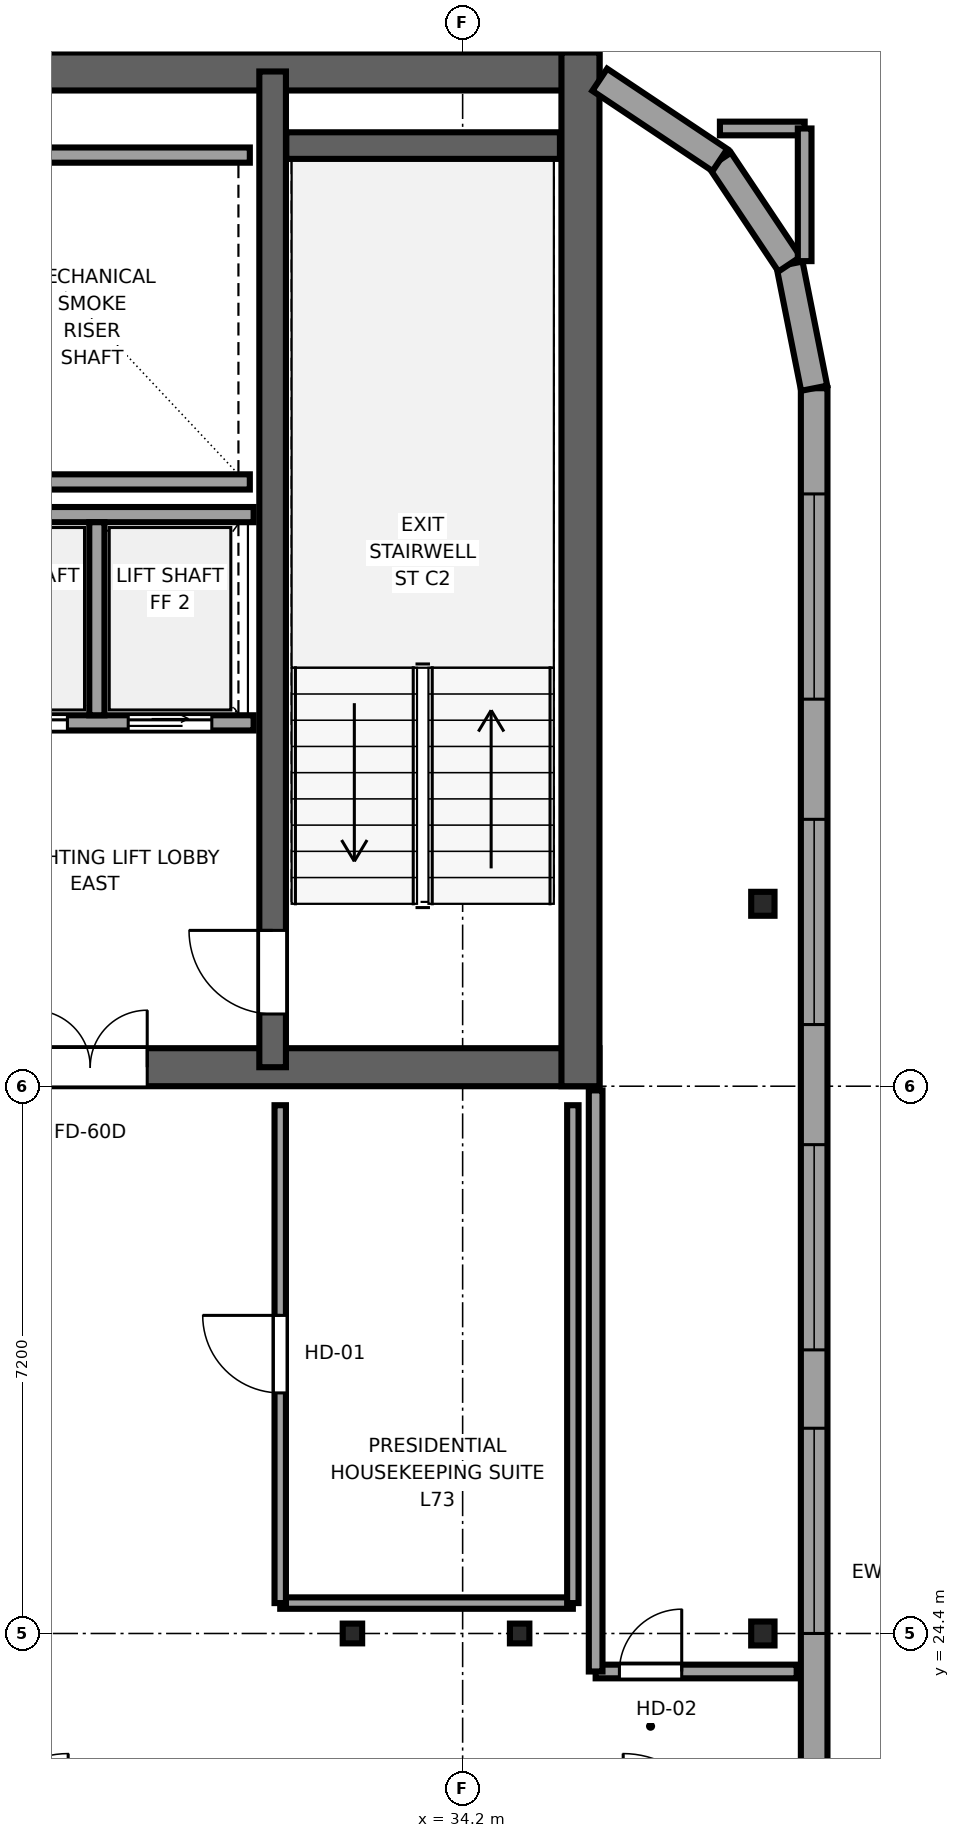
"""IFC4 building model, lengths in metres.
Left out: names, types, materials, properties, quantities, classifications, styles, units other than length and angle.
Written with IfcOpenShell. Run it as: python <this file> out.ifc"""

import sys

from ifc_helpers import new_model, si_unit, direction, frame, frame_2d, origin, origin_2d, place, context, subcontext, project, spatial, rectangle, i_section, extrude, source, transform, mapped, element, fill, save


model = new_model("IFC4")
c1 = context("Model", 3, precision=1e-05, world=origin(), true_north=direction((0.0, 1.0)))
c2 = subcontext(c1, "Body", "Model", "MODEL_VIEW")
j1 = project(units=[si_unit("LENGTHUNIT", "METRE"), si_unit("PLANEANGLEUNIT", "RADIAN")], contexts=[c1])
p1 = place(None, origin())
s1 = spatial("IfcSite", under=j1, at=p1, CompositionType="ELEMENT")
p2 = place(p1, origin())
s2 = spatial("IfcBuilding", under=s1, at=p2, CompositionType="ELEMENT")
p3 = place(p2, frame((0.0, 0.0, 275.05)))
s3 = spatial("IfcBuildingStorey", under=s2, at=p3, CompositionType="ELEMENT", Elevation=275.05)
p4 = place(p3, frame((10.0, 31.85, 0.0), z_axis=(0.0, 0.0, 1.0), x_axis=(1.0, 0.0, 0.0)))
e1 = element("IfcWall", 1, at=p4, inside=s3, PredefinedType="SHEAR", context=c2, shape_type="SweptSolid", body=[
    extrude(rectangle(XDim=26.0, YDim=0.5, at=frame_2d((13.0, 0.0))), origin(), (0.0, 0.0, 1.0), 3.55),
])
p5 = place(p4, frame((7.45, 0.0, 0.0), z_axis=(0.0, 0.0, 1.0), x_axis=(-1.0, 0.0, 0.0)))
e2 = element("IfcOpeningElement", 2, at=p5, cuts=e1, PredefinedType="OPENING", context=c2, shape_type="SweptSolid", body=[
    extrude(rectangle(XDim=1.5, YDim=2.04, at=frame_2d((0.75, 1.02))), frame((0.0, 0.26, 0.0), z_axis=(0.0, -1.0, 0.0), x_axis=(1.0, 0.0, 0.0)), (0.0, 0.0, 1.0), 0.52),
])
p6 = place(p4, frame((13.75, 0.0, 0.0), z_axis=(0.0, 0.0, 1.0), x_axis=(-1.0, 0.0, 0.0)))
e3 = element("IfcOpeningElement", 3, at=p6, cuts=e1, PredefinedType="OPENING", context=c2, shape_type="SweptSolid", body=[
    extrude(rectangle(XDim=1.5, YDim=2.04, at=frame_2d((0.75, 1.02))), frame((0.0, 0.26, 0.0), z_axis=(0.0, -1.0, 0.0), x_axis=(1.0, 0.0, 0.0)), (0.0, 0.0, 1.0), 0.52),
])
p7 = place(p4, frame((20.05, 0.0, 0.0), z_axis=(0.0, 0.0, 1.0), x_axis=(-1.0, 0.0, 0.0)))
e4 = element("IfcOpeningElement", 4, at=p7, cuts=e1, PredefinedType="OPENING", context=c2, shape_type="SweptSolid", body=[
    extrude(rectangle(XDim=1.5, YDim=2.04, at=frame_2d((0.75, 1.02))), frame((0.0, 0.26, 0.0), z_axis=(0.0, -1.0, 0.0), x_axis=(1.0, 0.0, 0.0)), (0.0, 0.0, 1.0), 0.52),
])
p8 = place(p3, frame((10.0, 44.95, 0.0), z_axis=(0.0, 0.0, 1.0), x_axis=(1.0, 0.0, 0.0)))
e5 = element("IfcWall", 5, at=p8, inside=s3, PredefinedType="SHEAR", context=c2, shape_type="SweptSolid", body=[
    extrude(rectangle(XDim=26.0, YDim=0.5, at=frame_2d((13.0, 0.0))), origin(), (0.0, 0.0, 1.0), 3.55),
])
p9 = place(p3, frame((35.75, 31.6, 0.0), z_axis=(0.0, 0.0, 1.0), x_axis=(0.0, 1.0, 0.0)))
e6 = element("IfcWall", 6, at=p9, inside=s3, PredefinedType="SHEAR", context=c2, shape_type="SweptSolid", body=[
    extrude(rectangle(XDim=13.6, YDim=0.5, at=frame_2d((6.8, 0.0))), origin(), (0.0, 0.0, 1.0), 3.55),
])
p10 = place(p3, frame((31.7, 31.85, 0.0), z_axis=(0.0, 0.0, 1.0), x_axis=(0.0, 1.0, 0.0)))
e7 = element("IfcWall", 7, at=p10, inside=s3, PredefinedType="SHEAR", context=c2, shape_type="SweptSolid", body=[
    extrude(rectangle(XDim=13.1, YDim=0.35, at=frame_2d((6.55, 0.0))), origin(), (0.0, 0.0, 1.0), 3.55),
])
p11 = place(p10, frame((1.8, 0.0, 0.0), z_axis=(0.0, 0.0, 1.0), x_axis=(-1.0, 0.0, 0.0)))
e8 = element("IfcOpeningElement", 8, at=p11, cuts=e7, PredefinedType="OPENING", context=c2, shape_type="SweptSolid", body=[
    extrude(rectangle(XDim=1.1, YDim=2.12, at=frame_2d((0.55, 1.06))), frame((0.0, 0.185, 0.0), z_axis=(0.0, -1.0, 0.0), x_axis=(1.0, 0.0, 0.0)), (0.0, 0.0, 1.0), 0.37),
])
p12 = place(p3, frame((31.88, 43.975, 0.0), z_axis=(0.0, 0.0, 1.0), x_axis=(1.0, 0.0, 0.0)))
e9 = element("IfcWall", 9, at=p12, inside=s3, PredefinedType="SHEAR", context=c2, shape_type="SweptSolid", body=[
    extrude(rectangle(XDim=3.6, YDim=0.35, at=frame_2d((1.8, 0.0))), origin(), (0.0, 0.0, 1.0), 3.55),
])
m1 = source(origin(), c2, "Body", "SweptSolid", [
    extrude(i_section(OverallWidth=0.256, OverallDepth=0.26, WebThickness=0.01, FlangeThickness=0.017, FilletRadius=0.014, at=origin_2d()), origin(), (0.0, 0.0, 1.0), 3.55),
])
for number, where, z_axis, x_axis in (
    (10, (32.75, 24.4, 0.0), (0.0, 0.0, 1.0), (1.0, 0.0, 0.0)),
    (11, (34.95, 24.4, 0.0), (0.0, 0.0, 1.0), (1.0, 0.0, 0.0)),
):
    element("IfcColumn", number, at=place(p3, frame(where, z_axis=z_axis, x_axis=x_axis)), inside=s3, PredefinedType="COLUMN", context=c2, shape_type="MappedRepresentation", body=[
        mapped(m1, transform((0.0, 0.0, 0.0), x_axis=(1.0, 0.0, 0.0), y_axis=(0.0, 1.0, 0.0), z_axis=(0.0, 0.0, 1.0), scale=1.0)),
    ])
m2 = source(origin(), c2, "Body", "SweptSolid", [
    extrude(i_section(OverallWidth=0.307, OverallDepth=0.315, WebThickness=0.012, FlangeThickness=0.019, FilletRadius=0.017, at=origin_2d()), origin(), (0.0, 0.0, 1.0), 3.55),
])
for number, where, z_axis, x_axis in (
    (12, (38.15, 24.4, 0.0), (0.0, 0.0, 1.0), (1.0, 0.0, 0.0)),
    (13, (38.15, 34.0, 0.0), (0.0, 0.0, 1.0), (1.0, 0.0, 0.0)),
):
    element("IfcColumn", number, at=place(p3, frame(where, z_axis=z_axis, x_axis=x_axis)), inside=s3, PredefinedType="COLUMN", context=c2, shape_type="MappedRepresentation", body=[
        mapped(m2, transform((0.0, 0.0, 0.0), x_axis=(1.0, 0.0, 0.0), y_axis=(0.0, 1.0, 0.0), z_axis=(0.0, 0.0, 1.0), scale=1.0)),
    ])
p13 = place(p3, frame((38.825, 9.617, 0.0), z_axis=(0.0, 0.0, 1.0), x_axis=(0.0, 1.0, 0.0)))
e14 = element("IfcWall", 14, at=p13, inside=s3, PredefinedType="SOLIDWALL", context=c2, shape_type="SweptSolid", body=[
    extrude(rectangle(XDim=31.166, YDim=0.35, at=frame_2d((15.583, 0.0))), origin(), (0.0, 0.0, 1.0), 3.33),
])
p14 = place(p13, frame((0.84, 0.0, 0.68)))
e15 = element("IfcOpeningElement", 15, at=p14, cuts=e14, PredefinedType="OPENING", context=c2, shape_type="SweptSolid", body=[
    extrude(rectangle(XDim=2.7, YDim=1.95, at=frame_2d((1.35, 0.975))), frame((0.0, 0.185, 0.0), z_axis=(0.0, -1.0, 0.0), x_axis=(1.0, 0.0, 0.0)), (0.0, 0.0, 1.0), 0.37),
])
p15 = place(p13, frame((5.671, 0.0, 0.68)))
e16 = element("IfcOpeningElement", 16, at=p15, cuts=e14, PredefinedType="OPENING", context=c2, shape_type="SweptSolid", body=[
    extrude(rectangle(XDim=2.7, YDim=1.95, at=frame_2d((1.35, 0.975))), frame((0.0, 0.185, 0.0), z_axis=(0.0, -1.0, 0.0), x_axis=(1.0, 0.0, 0.0)), (0.0, 0.0, 1.0), 0.37),
])
p16 = place(p13, frame((8.902, 0.0, 0.68)))
e17 = element("IfcOpeningElement", 17, at=p16, cuts=e14, PredefinedType="OPENING", context=c2, shape_type="SweptSolid", body=[
    extrude(rectangle(XDim=2.7, YDim=1.95, at=frame_2d((1.35, 0.975))), frame((0.0, 0.185, 0.0), z_axis=(0.0, -1.0, 0.0), x_axis=(1.0, 0.0, 0.0)), (0.0, 0.0, 1.0), 0.37),
])
p17 = place(p13, frame((14.783, 0.0, 0.68)))
e18 = element("IfcOpeningElement", 18, at=p17, cuts=e14, PredefinedType="OPENING", context=c2, shape_type="SweptSolid", body=[
    extrude(rectangle(XDim=2.7, YDim=1.95, at=frame_2d((1.35, 0.975))), frame((0.0, 0.185, 0.0), z_axis=(0.0, -1.0, 0.0), x_axis=(1.0, 0.0, 0.0)), (0.0, 0.0, 1.0), 0.37),
])
p18 = place(p13, frame((18.514, 0.0, 0.68)))
e19 = element("IfcOpeningElement", 19, at=p18, cuts=e14, PredefinedType="OPENING", context=c2, shape_type="SweptSolid", body=[
    extrude(rectangle(XDim=2.7, YDim=1.95, at=frame_2d((1.35, 0.975))), frame((0.0, 0.185, 0.0), z_axis=(0.0, -1.0, 0.0), x_axis=(1.0, 0.0, 0.0)), (0.0, 0.0, 1.0), 0.37),
])
p19 = place(p13, frame((22.794, 0.0, 0.68)))
e20 = element("IfcOpeningElement", 20, at=p19, cuts=e14, PredefinedType="OPENING", context=c2, shape_type="SweptSolid", body=[
    extrude(rectangle(XDim=2.7, YDim=1.95, at=frame_2d((1.35, 0.975))), frame((0.0, 0.185, 0.0), z_axis=(0.0, -1.0, 0.0), x_axis=(1.0, 0.0, 0.0)), (0.0, 0.0, 1.0), 0.37),
])
p20 = place(p13, frame((27.075, 0.0, 0.68)))
e21 = element("IfcOpeningElement", 21, at=p20, cuts=e14, PredefinedType="OPENING", context=c2, shape_type="SweptSolid", body=[
    extrude(rectangle(XDim=2.7, YDim=1.95, at=frame_2d((1.35, 0.975))), frame((0.0, 0.185, 0.0), z_axis=(0.0, -1.0, 0.0), x_axis=(1.0, 0.0, 0.0)), (0.0, 0.0, 1.0), 0.37),
])
p21 = place(p3, frame((38.825, 40.783, 0.0), z_axis=(0.0, 0.0, 1.0), x_axis=(-0.195044345786, 0.980794424524, 0.0)))
e22 = element("IfcWall", 22, at=p21, inside=s3, PredefinedType="SOLIDWALL", context=c2, shape_type="SweptSolid", body=[
    extrude(rectangle(XDim=1.665, YDim=0.35, at=frame_2d((0.833, 0.0))), origin(), (0.0, 0.0, 1.0), 3.33),
])
p22 = place(p3, frame((38.5, 42.416, 0.0), z_axis=(0.0, 0.0, 1.0), x_axis=(-0.555520825599, 0.831502623162, 0.0)))
e23 = element("IfcWall", 23, at=p22, inside=s3, PredefinedType="SOLIDWALL", context=c2, shape_type="SweptSolid", body=[
    extrude(rectangle(XDim=1.647, YDim=0.35, at=frame_2d((0.824, 0.0))), origin(), (0.0, 0.0, 1.0), 3.33),
])
p23 = place(p3, frame((37.585, 43.785, 0.0), z_axis=(0.0, 0.0, 1.0), x_axis=(-0.831516639465, 0.555499845448, 0.0)))
e24 = element("IfcWall", 24, at=p23, inside=s3, PredefinedType="SOLIDWALL", context=c2, shape_type="SweptSolid", body=[
    extrude(rectangle(XDim=1.902, YDim=0.35, at=frame_2d((0.951, 0.0))), origin(), (0.0, 0.0, 1.0), 3.33),
])
for number, where, z_axis, x_axis in (
    (25, (27.3, 39.55, 0.0), (0.0, 0.0, 1.0), (1.0, 0.0, 0.0)),
    (26, (27.3, 43.85, 0.0), (0.0, 0.0, 1.0), (1.0, 0.0, 0.0)),
):
    element("IfcWall", number, at=place(p3, frame(where, z_axis=z_axis, x_axis=x_axis)), inside=s3, PredefinedType="SOLIDWALL", context=c2, shape_type="SweptSolid", body=[
        extrude(rectangle(XDim=4.1, YDim=0.2, at=frame_2d((2.05, 0.0))), origin(), (0.0, 0.0, 1.0), 3.33),
    ])
p24 = place(p3, frame((27.375, 36.38, 0.0), z_axis=(0.0, 0.0, 1.0), x_axis=(1.0, 0.0, 0.0)))
e27 = element("IfcWall", 27, at=p24, inside=s3, PredefinedType="SOLIDWALL", context=c2, shape_type="SweptSolid", body=[
    extrude(rectangle(XDim=4.075, YDim=0.2, at=frame_2d((2.038, 0.0))), origin(), (0.0, 0.0, 1.0), 3.33),
])
p25 = place(p24, frame((0.525, 0.0, 0.0)))
e28 = element("IfcOpeningElement", 28, at=p25, cuts=e27, PredefinedType="OPENING", context=c2, shape_type="SweptSolid", body=[
    extrude(rectangle(XDim=1.1, YDim=2.12, at=frame_2d((0.55, 1.06))), frame((0.0, 0.11, 0.0), z_axis=(0.0, -1.0, 0.0), x_axis=(1.0, 0.0, 0.0)), (0.0, 0.0, 1.0), 0.22),
])
p26 = place(p24, frame((2.425, 0.0, 0.0)))
e29 = element("IfcOpeningElement", 29, at=p26, cuts=e27, PredefinedType="OPENING", context=c2, shape_type="SweptSolid", body=[
    extrude(rectangle(XDim=1.1, YDim=2.12, at=frame_2d((0.55, 1.06))), frame((0.0, 0.11, 0.0), z_axis=(0.0, -1.0, 0.0), x_axis=(1.0, 0.0, 0.0)), (0.0, 0.0, 1.0), 0.22),
])
p27 = place(p3, frame((27.375, 39.12, 0.0), z_axis=(0.0, 0.0, 1.0), x_axis=(1.0, 0.0, 0.0)))
e30 = element("IfcWall", 30, at=p27, inside=s3, PredefinedType="SOLIDWALL", context=c2, shape_type="SweptSolid", body=[
    extrude(rectangle(XDim=4.075, YDim=0.2, at=frame_2d((2.038, 0.0))), origin(), (0.0, 0.0, 1.0), 3.33),
])
p28 = place(p3, frame((29.387, 36.48, 0.0), z_axis=(0.0, 0.0, 1.0), x_axis=(0.0, 1.0, 0.0)))
e31 = element("IfcWall", 31, at=p28, inside=s3, PredefinedType="SOLIDWALL", context=c2, shape_type="SweptSolid", body=[
    extrude(rectangle(XDim=2.54, YDim=0.2, at=frame_2d((1.27, 0.0))), origin(), (0.0, 0.0, 1.0), 3.33),
])
p29 = place(p3, frame((31.8, 24.8, 0.0), z_axis=(0.0, 0.0, 1.0), x_axis=(1.0, 0.0, 0.0)))
e32 = element("IfcWall", 32, at=p29, inside=s3, PredefinedType="PARTITIONING", context=c2, shape_type="SweptSolid", body=[
    extrude(rectangle(XDim=3.85, YDim=0.15, at=frame_2d((1.925, 0.0))), origin(), (0.0, 0.0, 1.0), 3.33),
])
p30 = place(p3, frame((31.8, 24.8, 0.0), z_axis=(0.0, 0.0, 1.0), x_axis=(0.0, 1.0, 0.0)))
e33 = element("IfcWall", 33, at=p30, inside=s3, PredefinedType="PARTITIONING", context=c2, shape_type="SweptSolid", body=[
    extrude(rectangle(XDim=6.55, YDim=0.15, at=frame_2d((3.275, 0.0))), origin(), (0.0, 0.0, 1.0), 3.33),
])
p31 = place(p30, frame((2.765, 0.0, 0.0)))
e34 = element("IfcOpeningElement", 34, at=p31, cuts=e33, PredefinedType="OPENING", context=c2, shape_type="SweptSolid", body=[
    extrude(rectangle(XDim=1.02, YDim=2.03, at=frame_2d((0.51, 1.015))), frame((0.0, 0.085, 0.0), z_axis=(0.0, -1.0, 0.0), x_axis=(1.0, 0.0, 0.0)), (0.0, 0.0, 1.0), 0.17),
])
p32 = place(p3, frame((35.65, 24.8, 0.0), z_axis=(0.0, 0.0, 1.0), x_axis=(0.0, 1.0, 0.0)))
e35 = element("IfcWall", 35, at=p32, inside=s3, PredefinedType="PARTITIONING", context=c2, shape_type="SweptSolid", body=[
    extrude(rectangle(XDim=6.55, YDim=0.15, at=frame_2d((3.275, 0.0))), origin(), (0.0, 0.0, 1.0), 3.33),
])
p33 = place(p3, frame((35.95, 23.9, 0.0), z_axis=(0.0, 0.0, 1.0), x_axis=(1.0, 0.0, 0.0)))
e36 = element("IfcWall", 36, at=p33, inside=s3, PredefinedType="PARTITIONING", context=c2, shape_type="SweptSolid", body=[
    extrude(rectangle(XDim=2.645, YDim=0.18, at=frame_2d((1.323, 0.0))), origin(), (0.0, 0.0, 1.0), 3.33),
])
p34 = place(p33, frame((0.312, 0.0, 0.0)))
e37 = element("IfcOpeningElement", 37, at=p34, cuts=e36, PredefinedType="OPENING", context=c2, shape_type="SweptSolid", body=[
    extrude(rectangle(XDim=0.82, YDim=2.01, at=frame_2d((0.41, 1.005))), frame((0.0, 0.1, 0.0), z_axis=(0.0, -1.0, 0.0), x_axis=(1.0, 0.0, 0.0)), (0.0, 0.0, 1.0), 0.2),
])
p35 = place(p3, frame((37.585, 44.2, 0.0), z_axis=(0.0, 0.0, 1.0), x_axis=(1.0, 0.0, 0.0)))
e38 = element("IfcWall", 38, at=p35, inside=s3, PredefinedType="PARTITIONING", context=c2, shape_type="SweptSolid", body=[
    extrude(rectangle(XDim=1.115, YDim=0.18, at=frame_2d((0.558, 0.0))), origin(), (0.0, 0.0, 1.0), 3.33),
])
p36 = place(p3, frame((35.95, 23.9, 0.0), z_axis=(0.0, 0.0, 1.0), x_axis=(0.0, 1.0, 0.0)))
e39 = element("IfcWall", 39, at=p36, inside=s3, PredefinedType="PARTITIONING", context=c2, shape_type="SweptSolid", body=[
    extrude(rectangle(XDim=7.645, YDim=0.18, at=frame_2d((3.823, 0.0))), origin(), (0.0, 0.0, 1.0), 3.33),
])
p37 = place(p3, frame((38.7, 42.455, 0.0), z_axis=(0.0, 0.0, 1.0), x_axis=(0.0, 1.0, 0.0)))
e40 = element("IfcWall", 40, at=p37, inside=s3, PredefinedType="PARTITIONING", context=c2, shape_type="SweptSolid", body=[
    extrude(rectangle(XDim=1.745, YDim=0.18, at=frame_2d((0.873, 0.0))), origin(), (0.0, 0.0, 1.0), 3.33),
])
m3 = source(origin(), c2, "Body", "SweptSolid", [
    extrude(rectangle(XDim=2.7, YDim=1.95, at=frame_2d((1.35, 0.975))), frame((0.0, 0.09, 0.0), z_axis=(0.0, -1.0, 0.0), x_axis=(1.0, 0.0, 0.0)), (0.0, 0.0, 1.0), 0.06),
])
p38 = place(p17, origin())
e41 = element("IfcWindow", 41, at=p38, inside=s3, PartitioningType="TRIPLE_PANEL_HORIZONTAL", PredefinedType="WINDOW", context=c2, shape_type="MappedRepresentation", body=[
    mapped(m3, transform((0.0, 0.0, 0.0), x_axis=(1.0, 0.0, 0.0), y_axis=(0.0, 1.0, 0.0), z_axis=(0.0, 0.0, 1.0), scale=1.0)),
])
fill(e18, e41)
p39 = place(p18, origin())
e42 = element("IfcWindow", 42, at=p39, inside=s3, PartitioningType="TRIPLE_PANEL_HORIZONTAL", PredefinedType="WINDOW", context=c2, shape_type="MappedRepresentation", body=[
    mapped(m3, transform((0.0, 0.0, 0.0), x_axis=(1.0, 0.0, 0.0), y_axis=(0.0, 1.0, 0.0), z_axis=(0.0, 0.0, 1.0), scale=1.0)),
])
fill(e19, e42)
p40 = place(p19, origin())
e43 = element("IfcWindow", 43, at=p40, inside=s3, PartitioningType="TRIPLE_PANEL_HORIZONTAL", PredefinedType="WINDOW", context=c2, shape_type="MappedRepresentation", body=[
    mapped(m3, transform((0.0, 0.0, 0.0), x_axis=(1.0, 0.0, 0.0), y_axis=(0.0, 1.0, 0.0), z_axis=(0.0, 0.0, 1.0), scale=1.0)),
])
fill(e20, e43)
p41 = place(p20, origin())
e44 = element("IfcWindow", 44, at=p41, inside=s3, PartitioningType="TRIPLE_PANEL_HORIZONTAL", PredefinedType="WINDOW", context=c2, shape_type="MappedRepresentation", body=[
    mapped(m3, transform((0.0, 0.0, 0.0), x_axis=(1.0, 0.0, 0.0), y_axis=(0.0, 1.0, 0.0), z_axis=(0.0, 0.0, 1.0), scale=1.0)),
])
fill(e21, e44)
m4 = source(origin(), c2, "Body", "SweptSolid", [
    extrude(rectangle(XDim=1.1, YDim=2.12, at=frame_2d((0.55, 1.06))), frame((0.0, 0.025, 0.0), z_axis=(0.0, -1.0, 0.0), x_axis=(1.0, 0.0, 0.0)), (0.0, 0.0, 1.0), 0.05),
])
p42 = place(p11, origin())
e45 = element("IfcDoor", 45, at=p42, inside=s3, OperationType="SINGLE_SWING_RIGHT", PredefinedType="DOOR", context=c2, shape_type="MappedRepresentation", body=[
    mapped(m4, transform((0.0, 0.0, 0.0), x_axis=(1.0, 0.0, 0.0), y_axis=(0.0, 1.0, 0.0), z_axis=(0.0, 0.0, 1.0), scale=1.0)),
])
fill(e8, e45)
m5 = source(origin(), c2, "Body", "SweptSolid", [
    extrude(rectangle(XDim=1.5, YDim=2.04, at=frame_2d((0.75, 1.02))), frame((0.0, 0.025, 0.0), z_axis=(0.0, -1.0, 0.0), x_axis=(1.0, 0.0, 0.0)), (0.0, 0.0, 1.0), 0.05),
])
p43 = place(p7, origin())
e46 = element("IfcDoor", 46, at=p43, inside=s3, OperationType="DOUBLE_DOOR_SINGLE_SWING", PredefinedType="DOOR", context=c2, shape_type="MappedRepresentation", body=[
    mapped(m5, transform((0.0, 0.0, 0.0), x_axis=(1.0, 0.0, 0.0), y_axis=(0.0, 1.0, 0.0), z_axis=(0.0, 0.0, 1.0), scale=1.0)),
])
fill(e4, e46)
m6 = source(origin(), c2, "Body", "SweptSolid", [
    extrude(rectangle(XDim=1.1, YDim=2.12, at=frame_2d((0.55, 1.06))), frame((0.0, 0.025, 0.0), z_axis=(0.0, -1.0, 0.0), x_axis=(1.0, 0.0, 0.0)), (0.0, 0.0, 1.0), 0.05),
])
p44 = place(p25, origin())
e47 = element("IfcDoor", 47, at=p44, inside=s3, OperationType="SLIDING_TO_LEFT", PredefinedType="DOOR", context=c2, shape_type="MappedRepresentation", body=[
    mapped(m6, transform((0.0, 0.0, 0.0), x_axis=(1.0, 0.0, 0.0), y_axis=(0.0, 1.0, 0.0), z_axis=(0.0, 0.0, 1.0), scale=1.0)),
])
fill(e28, e47)
p45 = place(p26, origin())
e48 = element("IfcDoor", 48, at=p45, inside=s3, OperationType="SLIDING_TO_RIGHT", PredefinedType="DOOR", context=c2, shape_type="MappedRepresentation", body=[
    mapped(m6, transform((0.0, 0.0, 0.0), x_axis=(1.0, 0.0, 0.0), y_axis=(0.0, 1.0, 0.0), z_axis=(0.0, 0.0, 1.0), scale=1.0)),
])
fill(e29, e48)
m7 = source(origin(), c2, "Body", "SweptSolid", [
    extrude(rectangle(XDim=1.02, YDim=2.03, at=frame_2d((0.51, 1.015))), frame((0.0, 0.025, 0.0), z_axis=(0.0, -1.0, 0.0), x_axis=(1.0, 0.0, 0.0)), (0.0, 0.0, 1.0), 0.05),
])
p46 = place(p31, origin())
e49 = element("IfcDoor", 49, at=p46, inside=s3, OperationType="SINGLE_SWING_RIGHT", PredefinedType="DOOR", context=c2, shape_type="MappedRepresentation", body=[
    mapped(m7, transform((0.0, 0.0, 0.0), x_axis=(1.0, 0.0, 0.0), y_axis=(0.0, 1.0, 0.0), z_axis=(0.0, 0.0, 1.0), scale=1.0)),
])
fill(e34, e49)
m8 = source(origin(), c2, "Body", "SweptSolid", [
    extrude(rectangle(XDim=0.82, YDim=2.01, at=frame_2d((0.41, 1.005))), frame((0.0, 0.025, 0.0), z_axis=(0.0, -1.0, 0.0), x_axis=(1.0, 0.0, 0.0)), (0.0, 0.0, 1.0), 0.05),
])
p47 = place(p34, origin())
e50 = element("IfcDoor", 50, at=p47, inside=s3, OperationType="SINGLE_SWING_RIGHT", PredefinedType="DOOR", context=c2, shape_type="MappedRepresentation", body=[
    mapped(m8, transform((0.0, 0.0, 0.0), x_axis=(1.0, 0.0, 0.0), y_axis=(0.0, 1.0, 0.0), z_axis=(0.0, 0.0, 1.0), scale=1.0)),
])
fill(e37, e50)
save(model, sys.argv[1])
